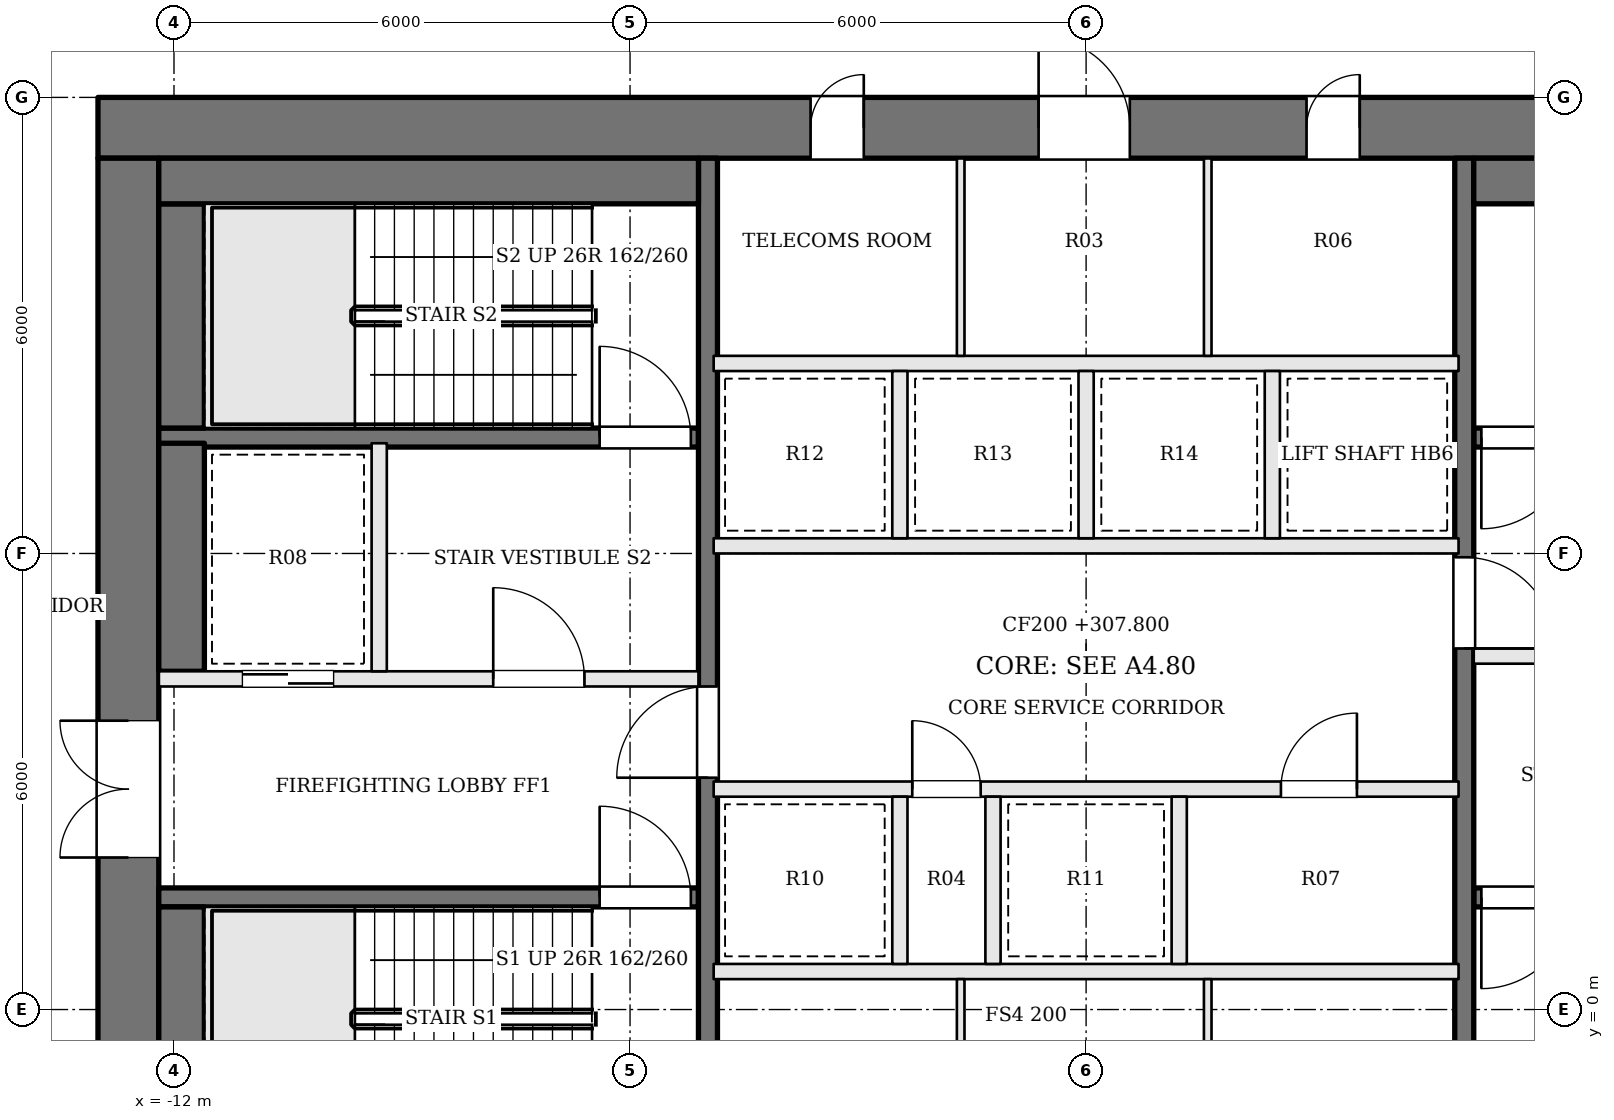
"""IFC4 building model, lengths in metres.
Left out: names, types, materials, properties, quantities, classifications, styles, units other than length and angle.
Written with IfcOpenShell. Run it as: python <this file> out.ifc"""

import sys

from ifc_helpers import new_model, si_unit, direction, frame, frame_2d, origin, place, context, subcontext, project, spatial, rectangle, extrude, element, fill, save


model = new_model("IFC4")
c1 = context("Model", 3, precision=1e-05, world=origin(), true_north=direction((0.0, 1.0)))
c2 = subcontext(c1, "Body", "Model", "MODEL_VIEW")
j1 = project(units=[si_unit("LENGTHUNIT", "METRE"), si_unit("PLANEANGLEUNIT", "RADIAN")], contexts=[c1])
p1 = place(None, origin())
s1 = spatial("IfcSite", under=j1, at=p1, CompositionType="ELEMENT")
p2 = place(p1, origin())
s2 = spatial("IfcBuilding", under=s1, at=p2, CompositionType="ELEMENT")
p3 = place(p2, frame((0.0, 0.0, 307.8)))
s3 = spatial("IfcBuildingStorey", under=s2, at=p3, CompositionType="ELEMENT", Elevation=307.8)
p4 = place(p3, frame((-13.0, 11.6, 0.0), z_axis=(0.0, 0.0, 1.0), x_axis=(1.0, 0.0, 0.0)))
e1 = element("IfcWall", 1, at=p4, inside=s3, PredefinedType="SHEAR", context=c2, shape_type="SweptSolid", body=[
    extrude(rectangle(XDim=26.0, YDim=0.8, at=frame_2d((13.0, 0.0))), origin(), (0.0, 0.0, 1.0), 4.2),
])
p5 = place(p4, frame((9.375, 0.0, 0.0)))
e2 = element("IfcOpeningElement", 2, at=p5, cuts=e1, PredefinedType="OPENING", context=c2, shape_type="SweptSolid", body=[
    extrude(rectangle(XDim=0.7, YDim=2.1, at=frame_2d((0.35, 1.05))), frame((0.0, 0.41, 0.0), z_axis=(0.0, -1.0, 0.0), x_axis=(1.0, 0.0, 0.0)), (0.0, 0.0, 1.0), 0.82),
])
p6 = place(p4, frame((12.375, 0.0, 0.0)))
e3 = element("IfcOpeningElement", 3, at=p6, cuts=e1, PredefinedType="OPENING", context=c2, shape_type="SweptSolid", body=[
    extrude(rectangle(XDim=1.2, YDim=2.1, at=frame_2d((0.6, 1.05))), frame((0.0, 0.41, 0.0), z_axis=(0.0, -1.0, 0.0), x_axis=(1.0, 0.0, 0.0)), (0.0, 0.0, 1.0), 0.82),
])
p7 = place(p4, frame((15.9, 0.0, 0.0)))
e4 = element("IfcOpeningElement", 4, at=p7, cuts=e1, PredefinedType="OPENING", context=c2, shape_type="SweptSolid", body=[
    extrude(rectangle(XDim=0.7, YDim=2.1, at=frame_2d((0.35, 1.05))), frame((0.0, 0.41, 0.0), z_axis=(0.0, -1.0, 0.0), x_axis=(1.0, 0.0, 0.0)), (0.0, 0.0, 1.0), 0.82),
])
p8 = place(p3, frame((-12.6, -2.2, 0.0), z_axis=(0.0, 0.0, 1.0), x_axis=(0.0, 1.0, 0.0)))
e5 = element("IfcWall", 5, at=p8, inside=s3, PredefinedType="SHEAR", context=c2, shape_type="SweptSolid", body=[
    extrude(rectangle(XDim=13.4, YDim=0.8, at=frame_2d((6.7, 0.0))), origin(), (0.0, 0.0, 1.0), 4.2),
])
p9 = place(p8, frame((4.2, 0.0, 0.0)))
e6 = element("IfcOpeningElement", 6, at=p9, cuts=e5, PredefinedType="OPENING", context=c2, shape_type="SweptSolid", body=[
    extrude(rectangle(XDim=1.8, YDim=2.1, at=frame_2d((0.9, 1.05))), frame((0.0, 0.41, 0.0), z_axis=(0.0, -1.0, 0.0), x_axis=(1.0, 0.0, 0.0)), (0.0, 0.0, 1.0), 0.82),
])
p10 = place(p3, frame((-12.2, 1.475, 0.0), z_axis=(0.0, 0.0, 1.0), x_axis=(1.0, 0.0, 0.0)))
e7 = element("IfcWall", 7, at=p10, inside=s3, PredefinedType="SOLIDWALL", context=c2, shape_type="SweptSolid", body=[
    extrude(rectangle(XDim=7.1, YDim=0.25, at=frame_2d((3.55, 0.0))), origin(), (0.0, 0.0, 1.0), 4.0),
])
p11 = place(p10, frame((5.8, 0.0, 0.0)))
e8 = element("IfcOpeningElement", 8, at=p11, cuts=e7, PredefinedType="OPENING", context=c2, shape_type="SweptSolid", body=[
    extrude(rectangle(XDim=1.2, YDim=2.1, at=frame_2d((0.6, 1.05))), frame((0.0, 0.135, 0.0), z_axis=(0.0, -1.0, 0.0), x_axis=(1.0, 0.0, 0.0)), (0.0, 0.0, 1.0), 0.27),
])
p12 = place(p3, frame((12.2, 7.525, 0.0), z_axis=(0.0, 0.0, 1.0), x_axis=(-1.0, 0.0, 0.0)))
e9 = element("IfcWall", 9, at=p12, inside=s3, PredefinedType="SOLIDWALL", context=c2, shape_type="SweptSolid", body=[
    extrude(rectangle(XDim=7.1, YDim=0.25, at=frame_2d((3.55, 0.0))), origin(), (0.0, 0.0, 1.0), 4.0),
])
p13 = place(p12, frame((5.8, 0.0, 0.0)))
e10 = element("IfcOpeningElement", 10, at=p13, cuts=e9, PredefinedType="OPENING", context=c2, shape_type="SweptSolid", body=[
    extrude(rectangle(XDim=1.2, YDim=2.1, at=frame_2d((0.6, 1.05))), frame((0.0, 0.135, 0.0), z_axis=(0.0, -1.0, 0.0), x_axis=(1.0, 0.0, 0.0)), (0.0, 0.0, 1.0), 0.27),
])
p14 = place(p3, frame((-12.2, 4.35, 0.0), z_axis=(0.0, 0.0, 1.0), x_axis=(1.0, 0.0, 0.0)))
e11 = element("IfcWall", 11, at=p14, inside=s3, PredefinedType="SOLIDWALL", context=c2, shape_type="SweptSolid", body=[
    extrude(rectangle(XDim=7.1, YDim=0.2, at=frame_2d((3.55, 0.0))), origin(), (0.0, 0.0, 1.0), 4.0),
])
p15 = place(p14, frame((4.4, 0.0, 0.0)))
e12 = element("IfcOpeningElement", 12, at=p15, cuts=e11, PredefinedType="OPENING", context=c2, shape_type="SweptSolid", body=[
    extrude(rectangle(XDim=1.2, YDim=2.1, at=frame_2d((0.6, 1.05))), frame((0.0, 0.11, 0.0), z_axis=(0.0, -1.0, 0.0), x_axis=(1.0, 0.0, 0.0)), (0.0, 0.0, 1.0), 0.22),
])
p16 = place(p14, frame((1.1, 0.0, 0.0)))
e13 = element("IfcOpeningElement", 13, at=p16, cuts=e11, PredefinedType="OPENING", context=c2, shape_type="SweptSolid", body=[
    extrude(rectangle(XDim=1.2, YDim=2.1, at=frame_2d((0.6, 1.05))), frame((0.0, 0.11, 0.0), z_axis=(0.0, -1.0, 0.0), x_axis=(1.0, 0.0, 0.0)), (0.0, 0.0, 1.0), 0.22),
])
p17 = place(p3, frame((12.2, 4.65, 0.0), z_axis=(0.0, 0.0, 1.0), x_axis=(-1.0, 0.0, 0.0)))
e14 = element("IfcWall", 14, at=p17, inside=s3, PredefinedType="SOLIDWALL", context=c2, shape_type="SweptSolid", body=[
    extrude(rectangle(XDim=7.1, YDim=0.2, at=frame_2d((3.55, 0.0))), origin(), (0.0, 0.0, 1.0), 4.0),
])
p18 = place(p17, frame((4.4, 0.0, 0.0)))
e15 = element("IfcOpeningElement", 15, at=p18, cuts=e14, PredefinedType="OPENING", context=c2, shape_type="SweptSolid", body=[
    extrude(rectangle(XDim=1.2, YDim=2.1, at=frame_2d((0.6, 1.05))), frame((0.0, 0.11, 0.0), z_axis=(0.0, -1.0, 0.0), x_axis=(1.0, 0.0, 0.0)), (0.0, 0.0, 1.0), 0.22),
])
p19 = place(p17, frame((1.1, 0.0, 0.0)))
e16 = element("IfcOpeningElement", 16, at=p19, cuts=e14, PredefinedType="OPENING", context=c2, shape_type="SweptSolid", body=[
    extrude(rectangle(XDim=1.2, YDim=2.1, at=frame_2d((0.6, 1.05))), frame((0.0, 0.11, 0.0), z_axis=(0.0, -1.0, 0.0), x_axis=(1.0, 0.0, 0.0)), (0.0, 0.0, 1.0), 0.22),
])
p20 = place(p3, frame((-12.2, 7.525, 0.0), z_axis=(0.0, 0.0, 1.0), x_axis=(1.0, 0.0, 0.0)))
e17 = element("IfcWall", 17, at=p20, inside=s3, PredefinedType="SOLIDWALL", context=c2, shape_type="SweptSolid", body=[
    extrude(rectangle(XDim=7.1, YDim=0.25, at=frame_2d((3.55, 0.0))), origin(), (0.0, 0.0, 1.0), 4.0),
])
p21 = place(p20, frame((5.8, 0.0, 0.0)))
e18 = element("IfcOpeningElement", 18, at=p21, cuts=e17, PredefinedType="OPENING", context=c2, shape_type="SweptSolid", body=[
    extrude(rectangle(XDim=1.2, YDim=2.1, at=frame_2d((0.6, 1.05))), frame((0.0, 0.135, 0.0), z_axis=(0.0, -1.0, 0.0), x_axis=(1.0, 0.0, 0.0)), (0.0, 0.0, 1.0), 0.27),
])
p22 = place(p3, frame((12.2, 1.475, 0.0), z_axis=(0.0, 0.0, 1.0), x_axis=(-1.0, 0.0, 0.0)))
e19 = element("IfcWall", 19, at=p22, inside=s3, PredefinedType="SOLIDWALL", context=c2, shape_type="SweptSolid", body=[
    extrude(rectangle(XDim=7.1, YDim=0.25, at=frame_2d((3.55, 0.0))), origin(), (0.0, 0.0, 1.0), 4.0),
])
p23 = place(p22, frame((5.8, 0.0, 0.0)))
e20 = element("IfcOpeningElement", 20, at=p23, cuts=e19, PredefinedType="OPENING", context=c2, shape_type="SweptSolid", body=[
    extrude(rectangle(XDim=1.2, YDim=2.1, at=frame_2d((0.6, 1.05))), frame((0.0, 0.135, 0.0), z_axis=(0.0, -1.0, 0.0), x_axis=(1.0, 0.0, 0.0)), (0.0, 0.0, 1.0), 0.27),
])
p24 = place(p3, frame((-9.3, 4.45, 0.0), z_axis=(0.0, 0.0, 1.0), x_axis=(0.0, 1.0, 0.0)))
e21 = element("IfcWall", 21, at=p24, inside=s3, PredefinedType="SOLIDWALL", context=c2, shape_type="SweptSolid", body=[
    extrude(rectangle(XDim=3.0, YDim=0.2, at=frame_2d((1.5, 0.0))), origin(), (0.0, 0.0, 1.0), 4.0),
])
p25 = place(p3, frame((-4.975, -2.2, 0.0), z_axis=(0.0, 0.0, 1.0), x_axis=(0.0, 1.0, 0.0)))
e22 = element("IfcWall", 22, at=p25, inside=s3, PredefinedType="SOLIDWALL", context=c2, shape_type="SweptSolid", body=[
    extrude(rectangle(XDim=13.4, YDim=0.25, at=frame_2d((6.7, 0.0))), origin(), (0.0, 0.0, 1.0), 4.0),
])
p26 = place(p25, frame((5.25, 0.0, 0.0)))
e23 = element("IfcOpeningElement", 23, at=p26, cuts=e22, PredefinedType="OPENING", context=c2, shape_type="SweptSolid", body=[
    extrude(rectangle(XDim=1.2, YDim=2.1, at=frame_2d((0.6, 1.05))), frame((0.0, 0.135, 0.0), z_axis=(0.0, -1.0, 0.0), x_axis=(1.0, 0.0, 0.0)), (0.0, 0.0, 1.0), 0.27),
])
p27 = place(p3, frame((4.975, 11.2, 0.0), z_axis=(0.0, 0.0, 1.0), x_axis=(0.0, -1.0, 0.0)))
e24 = element("IfcWall", 24, at=p27, inside=s3, PredefinedType="SOLIDWALL", context=c2, shape_type="SweptSolid", body=[
    extrude(rectangle(XDim=13.4, YDim=0.25, at=frame_2d((6.7, 0.0))), origin(), (0.0, 0.0, 1.0), 4.0),
])
p28 = place(p27, frame((5.25, 0.0, 0.0)))
e25 = element("IfcOpeningElement", 25, at=p28, cuts=e24, PredefinedType="OPENING", context=c2, shape_type="SweptSolid", body=[
    extrude(rectangle(XDim=1.2, YDim=2.1, at=frame_2d((0.6, 1.05))), frame((0.0, 0.135, 0.0), z_axis=(0.0, -1.0, 0.0), x_axis=(1.0, 0.0, 0.0)), (0.0, 0.0, 1.0), 0.27),
])
p29 = place(p3, frame((-11.9, -1.6, 0.0), z_axis=(0.0, 0.0, 1.0), x_axis=(0.0, 1.0, 0.0)))
e26 = element("IfcWall", 26, at=p29, inside=s3, PredefinedType="SOLIDWALL", context=c2, shape_type="SweptSolid", body=[
    extrude(rectangle(XDim=2.95, YDim=0.6, at=frame_2d((1.475, 0.0))), origin(), (0.0, 0.0, 1.0), 4.0),
])
p30 = place(p3, frame((-11.9, 4.45, 0.0), z_axis=(0.0, 0.0, 1.0), x_axis=(0.0, 1.0, 0.0)))
e27 = element("IfcWall", 27, at=p30, inside=s3, PredefinedType="SOLIDWALL", context=c2, shape_type="SweptSolid", body=[
    extrude(rectangle(XDim=3.0, YDim=0.6, at=frame_2d((1.5, 0.0))), origin(), (0.0, 0.0, 1.0), 4.0),
])
p31 = place(p3, frame((-11.9, 7.65, 0.0), z_axis=(0.0, 0.0, 1.0), x_axis=(0.0, 1.0, 0.0)))
e28 = element("IfcWall", 28, at=p31, inside=s3, PredefinedType="SOLIDWALL", context=c2, shape_type="SweptSolid", body=[
    extrude(rectangle(XDim=2.95, YDim=0.6, at=frame_2d((1.475, 0.0))), origin(), (0.0, 0.0, 1.0), 4.0),
])
for number, where, z_axis, x_axis in (
    (29, (-12.2, 10.9, 0.0), (0.0, 0.0, 1.0), (1.0, 0.0, 0.0)),
    (30, (12.2, 10.9, 0.0), (0.0, 0.0, 1.0), (-1.0, 0.0, 0.0)),
):
    element("IfcWall", number, at=place(p3, frame(where, z_axis=z_axis, x_axis=x_axis)), inside=s3, PredefinedType="SOLIDWALL", context=c2, shape_type="SweptSolid", body=[
        extrude(rectangle(XDim=7.1, YDim=0.6, at=frame_2d((3.55, 0.0))), origin(), (0.0, 0.0, 1.0), 4.0),
    ])
p32 = place(p3, frame((-4.9, 0.5, 0.0), z_axis=(0.0, 0.0, 1.0), x_axis=(1.0, 0.0, 0.0)))
e31 = element("IfcWall", 31, at=p32, inside=s3, PredefinedType="SOLIDWALL", context=c2, shape_type="SweptSolid", body=[
    extrude(rectangle(XDim=9.8, YDim=0.2, at=frame_2d((4.9, 0.0))), origin(), (0.0, 0.0, 1.0), 4.0),
])
p33 = place(p3, frame((-4.9, 2.9, 0.0), z_axis=(0.0, 0.0, 1.0), x_axis=(1.0, 0.0, 0.0)))
e32 = element("IfcWall", 32, at=p33, inside=s3, PredefinedType="SOLIDWALL", context=c2, shape_type="SweptSolid", body=[
    extrude(rectangle(XDim=9.8, YDim=0.2, at=frame_2d((4.9, 0.0))), origin(), (0.0, 0.0, 1.0), 4.0),
])
p34 = place(p33, frame((2.613, 0.0, 0.0)))
e33 = element("IfcOpeningElement", 33, at=p34, cuts=e32, PredefinedType="OPENING", context=c2, shape_type="SweptSolid", body=[
    extrude(rectangle(XDim=0.9, YDim=2.1, at=frame_2d((0.45, 1.05))), frame((0.0, 0.11, 0.0), z_axis=(0.0, -1.0, 0.0), x_axis=(1.0, 0.0, 0.0)), (0.0, 0.0, 1.0), 0.22),
])
p35 = place(p33, frame((7.463, 0.0, 0.0)))
e34 = element("IfcOpeningElement", 34, at=p35, cuts=e32, PredefinedType="OPENING", context=c2, shape_type="SweptSolid", body=[
    extrude(rectangle(XDim=1.0, YDim=2.1, at=frame_2d((0.5, 1.05))), frame((0.0, 0.11, 0.0), z_axis=(0.0, -1.0, 0.0), x_axis=(1.0, 0.0, 0.0)), (0.0, 0.0, 1.0), 0.22),
])
for number, where, z_axis, x_axis in (
    (35, (-4.9, 6.1, 0.0), (0.0, 0.0, 1.0), (1.0, 0.0, 0.0)),
    (36, (-4.9, 8.5, 0.0), (0.0, 0.0, 1.0), (1.0, 0.0, 0.0)),
):
    element("IfcWall", number, at=place(p3, frame(where, z_axis=z_axis, x_axis=x_axis)), inside=s3, PredefinedType="SOLIDWALL", context=c2, shape_type="SweptSolid", body=[
        extrude(rectangle(XDim=9.8, YDim=0.2, at=frame_2d((4.9, 0.0))), origin(), (0.0, 0.0, 1.0), 4.0),
    ])
for number, where, z_axis, x_axis in (
    (37, (-2.45, 0.6, 0.0), (0.0, 0.0, 1.0), (0.0, 1.0, 0.0)),
    (38, (-1.225, 0.6, 0.0), (0.0, 0.0, 1.0), (0.0, 1.0, 0.0)),
    (39, (1.225, 0.6, 0.0), (0.0, 0.0, 1.0), (0.0, 1.0, 0.0)),
    (40, (-2.45, 6.2, 0.0), (0.0, 0.0, 1.0), (0.0, 1.0, 0.0)),
    (41, (0.0, 6.2, 0.0), (0.0, 0.0, 1.0), (0.0, 1.0, 0.0)),
    (42, (2.45, 6.2, 0.0), (0.0, 0.0, 1.0), (0.0, 1.0, 0.0)),
):
    element("IfcWall", number, at=place(p3, frame(where, z_axis=z_axis, x_axis=x_axis)), inside=s3, PredefinedType="SOLIDWALL", context=c2, shape_type="SweptSolid", body=[
        extrude(rectangle(XDim=2.2, YDim=0.2, at=frame_2d((1.1, 0.0))), origin(), (0.0, 0.0, 1.0), 4.0),
    ])
for number, where, z_axis, x_axis in (
    (43, (-1.65, -2.2, 0.0), (0.0, 0.0, 1.0), (0.0, 1.0, 0.0)),
    (44, (1.6, -2.2, 0.0), (0.0, 0.0, 1.0), (0.0, 1.0, 0.0)),
    (45, (-1.65, 8.6, 0.0), (0.0, 0.0, 1.0), (0.0, 1.0, 0.0)),
    (46, (1.6, 8.6, 0.0), (0.0, 0.0, 1.0), (0.0, 1.0, 0.0)),
):
    element("IfcWall", number, at=place(p3, frame(where, z_axis=z_axis, x_axis=x_axis)), inside=s3, PredefinedType="PARTITIONING", context=c2, shape_type="SweptSolid", body=[
        extrude(rectangle(XDim=2.6, YDim=0.1, at=frame_2d((1.3, 0.0))), origin(), (0.0, 0.0, 1.0), 4.0),
    ])
p36 = place(p9, origin())
e47 = element("IfcDoor", 47, at=p36, inside=s3, OperationType="DOUBLE_DOOR_SINGLE_SWING", PredefinedType="DOOR", context=c2, shape_type="SweptSolid", body=[
    extrude(rectangle(XDim=1.8, YDim=2.1, at=frame_2d((0.9, 1.05))), frame((0.0, 0.025, 0.0), z_axis=(0.0, -1.0, 0.0), x_axis=(1.0, 0.0, 0.0)), (0.0, 0.0, 1.0), 0.05),
])
fill(e6, e47)
p37 = place(p26, origin())
e48 = element("IfcDoor", 48, at=p37, inside=s3, OperationType="SINGLE_SWING_LEFT", PredefinedType="DOOR", context=c2, shape_type="SweptSolid", body=[
    extrude(rectangle(XDim=1.2, YDim=2.1, at=frame_2d((0.6, 1.05))), frame((0.0, 0.025, 0.0), z_axis=(0.0, -1.0, 0.0), x_axis=(1.0, 0.0, 0.0)), (0.0, 0.0, 1.0), 0.05),
])
fill(e23, e48)
p38 = place(p28, origin())
e49 = element("IfcDoor", 49, at=p38, inside=s3, OperationType="SINGLE_SWING_RIGHT", PredefinedType="DOOR", context=c2, shape_type="SweptSolid", body=[
    extrude(rectangle(XDim=1.2, YDim=2.1, at=frame_2d((0.6, 1.05))), frame((0.0, 0.025, 0.0), z_axis=(0.0, -1.0, 0.0), x_axis=(1.0, 0.0, 0.0)), (0.0, 0.0, 1.0), 0.05),
])
fill(e25, e49)
p39 = place(p15, origin())
e50 = element("IfcDoor", 50, at=p39, inside=s3, OperationType="SINGLE_SWING_LEFT", PredefinedType="DOOR", context=c2, shape_type="SweptSolid", body=[
    extrude(rectangle(XDim=1.2, YDim=2.1, at=frame_2d((0.6, 1.05))), frame((0.0, 0.025, 0.0), z_axis=(0.0, -1.0, 0.0), x_axis=(1.0, 0.0, 0.0)), (0.0, 0.0, 1.0), 0.05),
])
fill(e12, e50)
p40 = place(p11, origin())
e51 = element("IfcDoor", 51, at=p40, inside=s3, OperationType="SINGLE_SWING_LEFT", PredefinedType="DOOR", context=c2, shape_type="SweptSolid", body=[
    extrude(rectangle(XDim=1.2, YDim=2.1, at=frame_2d((0.6, 1.05))), frame((0.0, 0.025, 0.0), z_axis=(0.0, -1.0, 0.0), x_axis=(1.0, 0.0, 0.0)), (0.0, 0.0, 1.0), 0.05),
])
fill(e8, e51)
p41 = place(p13, origin())
e52 = element("IfcDoor", 52, at=p41, inside=s3, OperationType="SINGLE_SWING_RIGHT", PredefinedType="DOOR", context=c2, shape_type="SweptSolid", body=[
    extrude(rectangle(XDim=1.2, YDim=2.1, at=frame_2d((0.6, 1.05))), frame((0.0, 0.025, 0.0), z_axis=(0.0, -1.0, 0.0), x_axis=(1.0, 0.0, 0.0)), (0.0, 0.0, 1.0), 0.05),
])
fill(e10, e52)
p42 = place(p21, origin())
e53 = element("IfcDoor", 53, at=p42, inside=s3, OperationType="SINGLE_SWING_LEFT", PredefinedType="DOOR", context=c2, shape_type="SweptSolid", body=[
    extrude(rectangle(XDim=1.2, YDim=2.1, at=frame_2d((0.6, 1.05))), frame((0.0, 0.025, 0.0), z_axis=(0.0, -1.0, 0.0), x_axis=(1.0, 0.0, 0.0)), (0.0, 0.0, 1.0), 0.05),
])
fill(e18, e53)
p43 = place(p23, origin())
e54 = element("IfcDoor", 54, at=p43, inside=s3, OperationType="SINGLE_SWING_RIGHT", PredefinedType="DOOR", context=c2, shape_type="SweptSolid", body=[
    extrude(rectangle(XDim=1.2, YDim=2.1, at=frame_2d((0.6, 1.05))), frame((0.0, 0.025, 0.0), z_axis=(0.0, -1.0, 0.0), x_axis=(1.0, 0.0, 0.0)), (0.0, 0.0, 1.0), 0.05),
])
fill(e20, e54)
p44 = place(p16, origin())
e55 = element("IfcDoor", 55, at=p44, inside=s3, OperationType="SLIDING_TO_RIGHT", PredefinedType="DOOR", context=c2, shape_type="SweptSolid", body=[
    extrude(rectangle(XDim=1.2, YDim=2.1, at=frame_2d((0.6, 1.05))), frame((0.0, 0.025, 0.0), z_axis=(0.0, -1.0, 0.0), x_axis=(1.0, 0.0, 0.0)), (0.0, 0.0, 1.0), 0.05),
])
fill(e13, e55)
p45 = place(p34, origin())
e56 = element("IfcDoor", 56, at=p45, inside=s3, OperationType="SINGLE_SWING_LEFT", PredefinedType="DOOR", context=c2, shape_type="SweptSolid", body=[
    extrude(rectangle(XDim=0.9, YDim=2.1, at=frame_2d((0.45, 1.05))), frame((0.0, 0.025, 0.0), z_axis=(0.0, -1.0, 0.0), x_axis=(1.0, 0.0, 0.0)), (0.0, 0.0, 1.0), 0.05),
])
fill(e33, e56)
p46 = place(p35, origin())
e57 = element("IfcDoor", 57, at=p46, inside=s3, OperationType="SINGLE_SWING_RIGHT", PredefinedType="DOOR", context=c2, shape_type="SweptSolid", body=[
    extrude(rectangle(XDim=1.0, YDim=2.1, at=frame_2d((0.5, 1.05))), frame((0.0, 0.025, 0.0), z_axis=(0.0, -1.0, 0.0), x_axis=(1.0, 0.0, 0.0)), (0.0, 0.0, 1.0), 0.05),
])
fill(e34, e57)
p47 = place(p5, origin())
e58 = element("IfcDoor", 58, at=p47, inside=s3, OperationType="SINGLE_SWING_RIGHT", PredefinedType="DOOR", context=c2, shape_type="SweptSolid", body=[
    extrude(rectangle(XDim=0.7, YDim=2.1, at=frame_2d((0.35, 1.05))), frame((0.0, 0.025, 0.0), z_axis=(0.0, -1.0, 0.0), x_axis=(1.0, 0.0, 0.0)), (0.0, 0.0, 1.0), 0.05),
])
fill(e2, e58)
p48 = place(p6, origin())
e59 = element("IfcDoor", 59, at=p48, inside=s3, OperationType="SINGLE_SWING_LEFT", PredefinedType="DOOR", context=c2, shape_type="SweptSolid", body=[
    extrude(rectangle(XDim=1.2, YDim=2.1, at=frame_2d((0.6, 1.05))), frame((0.0, 0.025, 0.0), z_axis=(0.0, -1.0, 0.0), x_axis=(1.0, 0.0, 0.0)), (0.0, 0.0, 1.0), 0.05),
])
fill(e3, e59)
p49 = place(p7, origin())
e60 = element("IfcDoor", 60, at=p49, inside=s3, OperationType="SINGLE_SWING_RIGHT", PredefinedType="DOOR", context=c2, shape_type="SweptSolid", body=[
    extrude(rectangle(XDim=0.7, YDim=2.1, at=frame_2d((0.35, 1.05))), frame((0.0, 0.025, 0.0), z_axis=(0.0, -1.0, 0.0), x_axis=(1.0, 0.0, 0.0)), (0.0, 0.0, 1.0), 0.05),
])
fill(e4, e60)
save(model, sys.argv[1])
